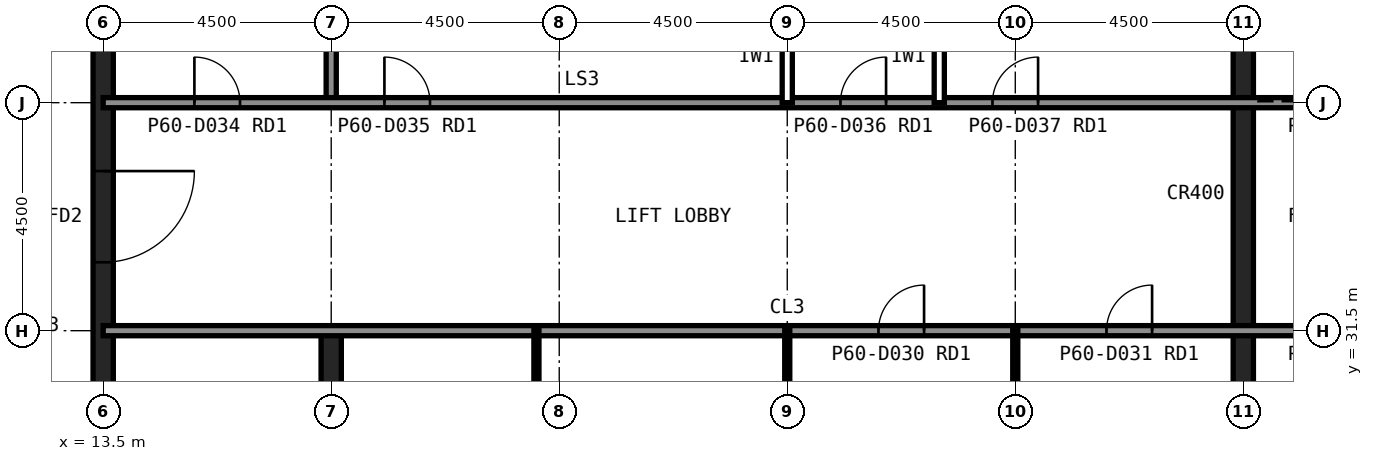
"""IFC4 building model, lengths in metres.
Left out: names, types, materials, properties, quantities, classifications, styles, units other than length and angle.
Written with IfcOpenShell. Run it as: python <this file> out.ifc"""

import sys

from ifc_helpers import new_model, si_unit, direction, frame, frame_2d, origin, place, context, subcontext, project, spatial, rectangle, extrude, element, fill, save


model = new_model("IFC4")
c1 = context("Model", 3, precision=1e-05, world=origin(), true_north=direction((0.0, 1.0)))
c2 = subcontext(c1, "Body", "Model", "MODEL_VIEW")
j1 = project(units=[si_unit("LENGTHUNIT", "METRE"), si_unit("PLANEANGLEUNIT", "RADIAN")], contexts=[c1])
p1 = place(None, origin())
s1 = spatial("IfcSite", under=j1, at=p1, CompositionType="ELEMENT")
p2 = place(p1, origin())
s2 = spatial("IfcBuilding", under=s1, at=p2, CompositionType="ELEMENT")
p3 = place(p2, frame((0.0, 0.0, 254.6)))
s3 = spatial("IfcBuildingStorey", under=s2, at=p3, CompositionType="ELEMENT", Elevation=254.6)
p4 = place(p3, frame((13.5, 40.5, 0.0), z_axis=(0.0, 0.0, 1.0), x_axis=(0.0, -1.0, 0.0)))
e1 = element("IfcWall", 1, at=p4, inside=s3, PredefinedType="SHEAR", context=c2, shape_type="SweptSolid", body=[
    extrude(rectangle(XDim=27.0, YDim=0.4, at=frame_2d((13.5, 0.0))), origin(), (0.0, 0.0, 1.0), 4.0),
])
p5 = place(p4, frame((19.65, 0.0, 0.0)))
e2 = element("IfcOpeningElement", 2, at=p5, cuts=e1, PredefinedType="OPENING", context=c2, shape_type="SweptSolid", body=[
    extrude(rectangle(XDim=1.2, YDim=2.1, at=frame_2d((0.6, 1.05))), frame((0.0, 0.21, 0.0), z_axis=(0.0, -1.0, 0.0), x_axis=(1.0, 0.0, 0.0)), (0.0, 0.0, 1.0), 0.42),
])
p6 = place(p4, frame((5.85, 0.0, 0.0)))
e3 = element("IfcOpeningElement", 3, at=p6, cuts=e1, PredefinedType="OPENING", context=c2, shape_type="SweptSolid", body=[
    extrude(rectangle(XDim=1.8, YDim=2.1, at=frame_2d((0.9, 1.05))), frame((0.0, 0.21, 0.0), z_axis=(0.0, -1.0, 0.0), x_axis=(1.0, 0.0, 0.0)), (0.0, 0.0, 1.0), 0.42),
])
p7 = place(p3, frame((18.0, 13.5, 0.0), z_axis=(0.0, 0.0, 1.0), x_axis=(0.0, 1.0, 0.0)))
e4 = element("IfcWall", 4, at=p7, inside=s3, PredefinedType="SHEAR", context=c2, shape_type="SweptSolid", body=[
    extrude(rectangle(XDim=18.0, YDim=0.4, at=frame_2d((9.0, 0.0))), origin(), (0.0, 0.0, 1.0), 4.0),
])
p8 = place(p3, frame((18.0, 36.0, 0.0), z_axis=(0.0, 0.0, 1.0), x_axis=(0.0, 1.0, 0.0)))
e5 = element("IfcWall", 5, at=p8, inside=s3, PredefinedType="SOLIDWALL", context=c2, shape_type="SweptSolid", body=[
    extrude(rectangle(XDim=4.5, YDim=0.2, at=frame_2d((2.25, 0.0))), origin(), (0.0, 0.0, 1.0), 3.84),
])
p9 = place(p3, frame((36.0, 22.5, 0.0), z_axis=(0.0, 0.0, 1.0), x_axis=(0.0, 1.0, 0.0)))
e6 = element("IfcWall", 6, at=p9, inside=s3, PredefinedType="SHEAR", context=c2, shape_type="SweptSolid", body=[
    extrude(rectangle(XDim=18.0, YDim=0.4, at=frame_2d((9.0, 0.0))), origin(), (0.0, 0.0, 1.0), 4.0),
])
p10 = place(p3, frame((13.5, 36.0, 0.0), z_axis=(0.0, 0.0, 1.0), x_axis=(1.0, 0.0, 0.0)))
e7 = element("IfcWall", 7, at=p10, inside=s3, PredefinedType="SOLIDWALL", context=c2, shape_type="SweptSolid", body=[
    extrude(rectangle(XDim=27.0, YDim=0.2, at=frame_2d((13.5, 0.0))), origin(), (0.0, 0.0, 1.0), 3.84),
])
p11 = place(p10, frame((1.8, 0.0, 0.0)))
e8 = element("IfcOpeningElement", 8, at=p11, cuts=e7, PredefinedType="OPENING", context=c2, shape_type="SweptSolid", body=[
    extrude(rectangle(XDim=0.9, YDim=2.1, at=frame_2d((0.45, 1.05))), frame((0.0, 0.11, 0.0), z_axis=(0.0, -1.0, 0.0), x_axis=(1.0, 0.0, 0.0)), (0.0, 0.0, 1.0), 0.22),
])
p12 = place(p10, frame((5.55, 0.0, 0.0)))
e9 = element("IfcOpeningElement", 9, at=p12, cuts=e7, PredefinedType="OPENING", context=c2, shape_type="SweptSolid", body=[
    extrude(rectangle(XDim=0.9, YDim=2.1, at=frame_2d((0.45, 1.05))), frame((0.0, 0.11, 0.0), z_axis=(0.0, -1.0, 0.0), x_axis=(1.0, 0.0, 0.0)), (0.0, 0.0, 1.0), 0.22),
])
p13 = place(p10, frame((14.55, 0.0, 0.0)))
e10 = element("IfcOpeningElement", 10, at=p13, cuts=e7, PredefinedType="OPENING", context=c2, shape_type="SweptSolid", body=[
    extrude(rectangle(XDim=0.9, YDim=2.1, at=frame_2d((0.45, 1.05))), frame((0.0, 0.11, 0.0), z_axis=(0.0, -1.0, 0.0), x_axis=(1.0, 0.0, 0.0)), (0.0, 0.0, 1.0), 0.22),
])
p14 = place(p10, frame((17.55, 0.0, 0.0)))
e11 = element("IfcOpeningElement", 11, at=p14, cuts=e7, PredefinedType="OPENING", context=c2, shape_type="SweptSolid", body=[
    extrude(rectangle(XDim=0.9, YDim=2.1, at=frame_2d((0.45, 1.05))), frame((0.0, 0.11, 0.0), z_axis=(0.0, -1.0, 0.0), x_axis=(1.0, 0.0, 0.0)), (0.0, 0.0, 1.0), 0.22),
])
p15 = place(p10, frame((24.1, 0.0, 0.0)))
e12 = element("IfcOpeningElement", 12, at=p15, cuts=e7, PredefinedType="OPENING", context=c2, shape_type="SweptSolid", body=[
    extrude(rectangle(XDim=1.3, YDim=2.2, at=frame_2d((0.65, 1.1))), frame((0.0, 0.11, 0.0), z_axis=(0.0, -1.0, 0.0), x_axis=(1.0, 0.0, 0.0)), (0.0, 0.0, 1.0), 0.22),
])
p16 = place(p3, frame((13.5, 31.5, 0.0), z_axis=(0.0, 0.0, 1.0), x_axis=(1.0, 0.0, 0.0)))
e13 = element("IfcWall", 13, at=p16, inside=s3, PredefinedType="SOLIDWALL", context=c2, shape_type="SweptSolid", body=[
    extrude(rectangle(XDim=27.0, YDim=0.2, at=frame_2d((13.5, 0.0))), origin(), (0.0, 0.0, 1.0), 3.84),
])
p17 = place(p16, frame((24.15, 0.0, 0.0)))
e14 = element("IfcOpeningElement", 14, at=p17, cuts=e13, PredefinedType="OPENING", context=c2, shape_type="SweptSolid", body=[
    extrude(rectangle(XDim=1.2, YDim=2.1, at=frame_2d((0.6, 1.05))), frame((0.0, 0.11, 0.0), z_axis=(0.0, -1.0, 0.0), x_axis=(1.0, 0.0, 0.0)), (0.0, 0.0, 1.0), 0.22),
])
p18 = place(p16, frame((15.3, 0.0, 0.0)))
e15 = element("IfcOpeningElement", 15, at=p18, cuts=e13, PredefinedType="OPENING", context=c2, shape_type="SweptSolid", body=[
    extrude(rectangle(XDim=0.9, YDim=2.1, at=frame_2d((0.45, 1.05))), frame((0.0, 0.11, 0.0), z_axis=(0.0, -1.0, 0.0), x_axis=(1.0, 0.0, 0.0)), (0.0, 0.0, 1.0), 0.22),
])
p19 = place(p16, frame((19.8, 0.0, 0.0)))
e16 = element("IfcOpeningElement", 16, at=p19, cuts=e13, PredefinedType="OPENING", context=c2, shape_type="SweptSolid", body=[
    extrude(rectangle(XDim=0.9, YDim=2.1, at=frame_2d((0.45, 1.05))), frame((0.0, 0.11, 0.0), z_axis=(0.0, -1.0, 0.0), x_axis=(1.0, 0.0, 0.0)), (0.0, 0.0, 1.0), 0.22),
])
for number, where, z_axis, x_axis in (
    (17, (27.0, 36.0, 0.0), (0.0, 0.0, 1.0), (0.0, 1.0, 0.0)),
    (18, (30.0, 36.0, 0.0), (0.0, 0.0, 1.0), (0.0, 1.0, 0.0)),
):
    element("IfcWall", number, at=place(p3, frame(where, z_axis=z_axis, x_axis=x_axis)), inside=s3, PredefinedType="PARTITIONING", context=c2, shape_type="SweptSolid", body=[
        extrude(rectangle(XDim=4.5, YDim=0.2, at=frame_2d((2.25, 0.0))), origin(), (0.0, 0.0, 1.0), 3.84),
    ])
for number, where, z_axis, x_axis in (
    (19, (22.05, 22.5, 0.0), (0.0, 0.0, 1.0), (0.0, 1.0, 0.0)),
    (20, (27.0, 22.5, 0.0), (0.0, 0.0, 1.0), (0.0, 1.0, 0.0)),
    (21, (31.5, 22.5, 0.0), (0.0, 0.0, 1.0), (0.0, 1.0, 0.0)),
):
    element("IfcWall", number, at=place(p3, frame(where, z_axis=z_axis, x_axis=x_axis)), inside=s3, PredefinedType="PLUMBINGWALL", context=c2, shape_type="SweptSolid", body=[
        extrude(rectangle(XDim=9.0, YDim=0.1, at=frame_2d((4.5, 0.0))), origin(), (0.0, 0.0, 1.0), 3.84),
    ])
p20 = place(p6, origin())
e22 = element("IfcDoor", 22, at=p20, inside=s3, OperationType="SINGLE_SWING_LEFT", PredefinedType="DOOR", context=c2, shape_type="SweptSolid", body=[
    extrude(rectangle(XDim=1.8, YDim=2.1, at=frame_2d((0.9, 1.05))), frame((0.0, 0.025, 0.0), z_axis=(0.0, -1.0, 0.0), x_axis=(1.0, 0.0, 0.0)), (0.0, 0.0, 1.0), 0.05),
])
fill(e3, e22)
p21 = place(p18, origin())
e23 = element("IfcDoor", 23, at=p21, inside=s3, OperationType="SINGLE_SWING_RIGHT", PredefinedType="DOOR", context=c2, shape_type="SweptSolid", body=[
    extrude(rectangle(XDim=0.9, YDim=2.1, at=frame_2d((0.45, 1.05))), frame((0.0, 0.025, 0.0), z_axis=(0.0, -1.0, 0.0), x_axis=(1.0, 0.0, 0.0)), (0.0, 0.0, 1.0), 0.05),
])
fill(e15, e23)
p22 = place(p19, origin())
e24 = element("IfcDoor", 24, at=p22, inside=s3, OperationType="SINGLE_SWING_RIGHT", PredefinedType="DOOR", context=c2, shape_type="SweptSolid", body=[
    extrude(rectangle(XDim=0.9, YDim=2.1, at=frame_2d((0.45, 1.05))), frame((0.0, 0.025, 0.0), z_axis=(0.0, -1.0, 0.0), x_axis=(1.0, 0.0, 0.0)), (0.0, 0.0, 1.0), 0.05),
])
fill(e16, e24)
p23 = place(p11, origin())
e25 = element("IfcDoor", 25, at=p23, inside=s3, OperationType="SINGLE_SWING_LEFT", PredefinedType="DOOR", context=c2, shape_type="SweptSolid", body=[
    extrude(rectangle(XDim=0.9, YDim=2.1, at=frame_2d((0.45, 1.05))), frame((0.0, 0.025, 0.0), z_axis=(0.0, -1.0, 0.0), x_axis=(1.0, 0.0, 0.0)), (0.0, 0.0, 1.0), 0.05),
])
fill(e8, e25)
p24 = place(p12, origin())
e26 = element("IfcDoor", 26, at=p24, inside=s3, OperationType="SINGLE_SWING_LEFT", PredefinedType="DOOR", context=c2, shape_type="SweptSolid", body=[
    extrude(rectangle(XDim=0.9, YDim=2.1, at=frame_2d((0.45, 1.05))), frame((0.0, 0.025, 0.0), z_axis=(0.0, -1.0, 0.0), x_axis=(1.0, 0.0, 0.0)), (0.0, 0.0, 1.0), 0.05),
])
fill(e9, e26)
p25 = place(p13, origin())
e27 = element("IfcDoor", 27, at=p25, inside=s3, OperationType="SINGLE_SWING_RIGHT", PredefinedType="DOOR", context=c2, shape_type="SweptSolid", body=[
    extrude(rectangle(XDim=0.9, YDim=2.1, at=frame_2d((0.45, 1.05))), frame((0.0, 0.025, 0.0), z_axis=(0.0, -1.0, 0.0), x_axis=(1.0, 0.0, 0.0)), (0.0, 0.0, 1.0), 0.05),
])
fill(e10, e27)
p26 = place(p14, origin())
e28 = element("IfcDoor", 28, at=p26, inside=s3, OperationType="SINGLE_SWING_RIGHT", PredefinedType="DOOR", context=c2, shape_type="SweptSolid", body=[
    extrude(rectangle(XDim=0.9, YDim=2.1, at=frame_2d((0.45, 1.05))), frame((0.0, 0.025, 0.0), z_axis=(0.0, -1.0, 0.0), x_axis=(1.0, 0.0, 0.0)), (0.0, 0.0, 1.0), 0.05),
])
fill(e11, e28)
save(model, sys.argv[1])
